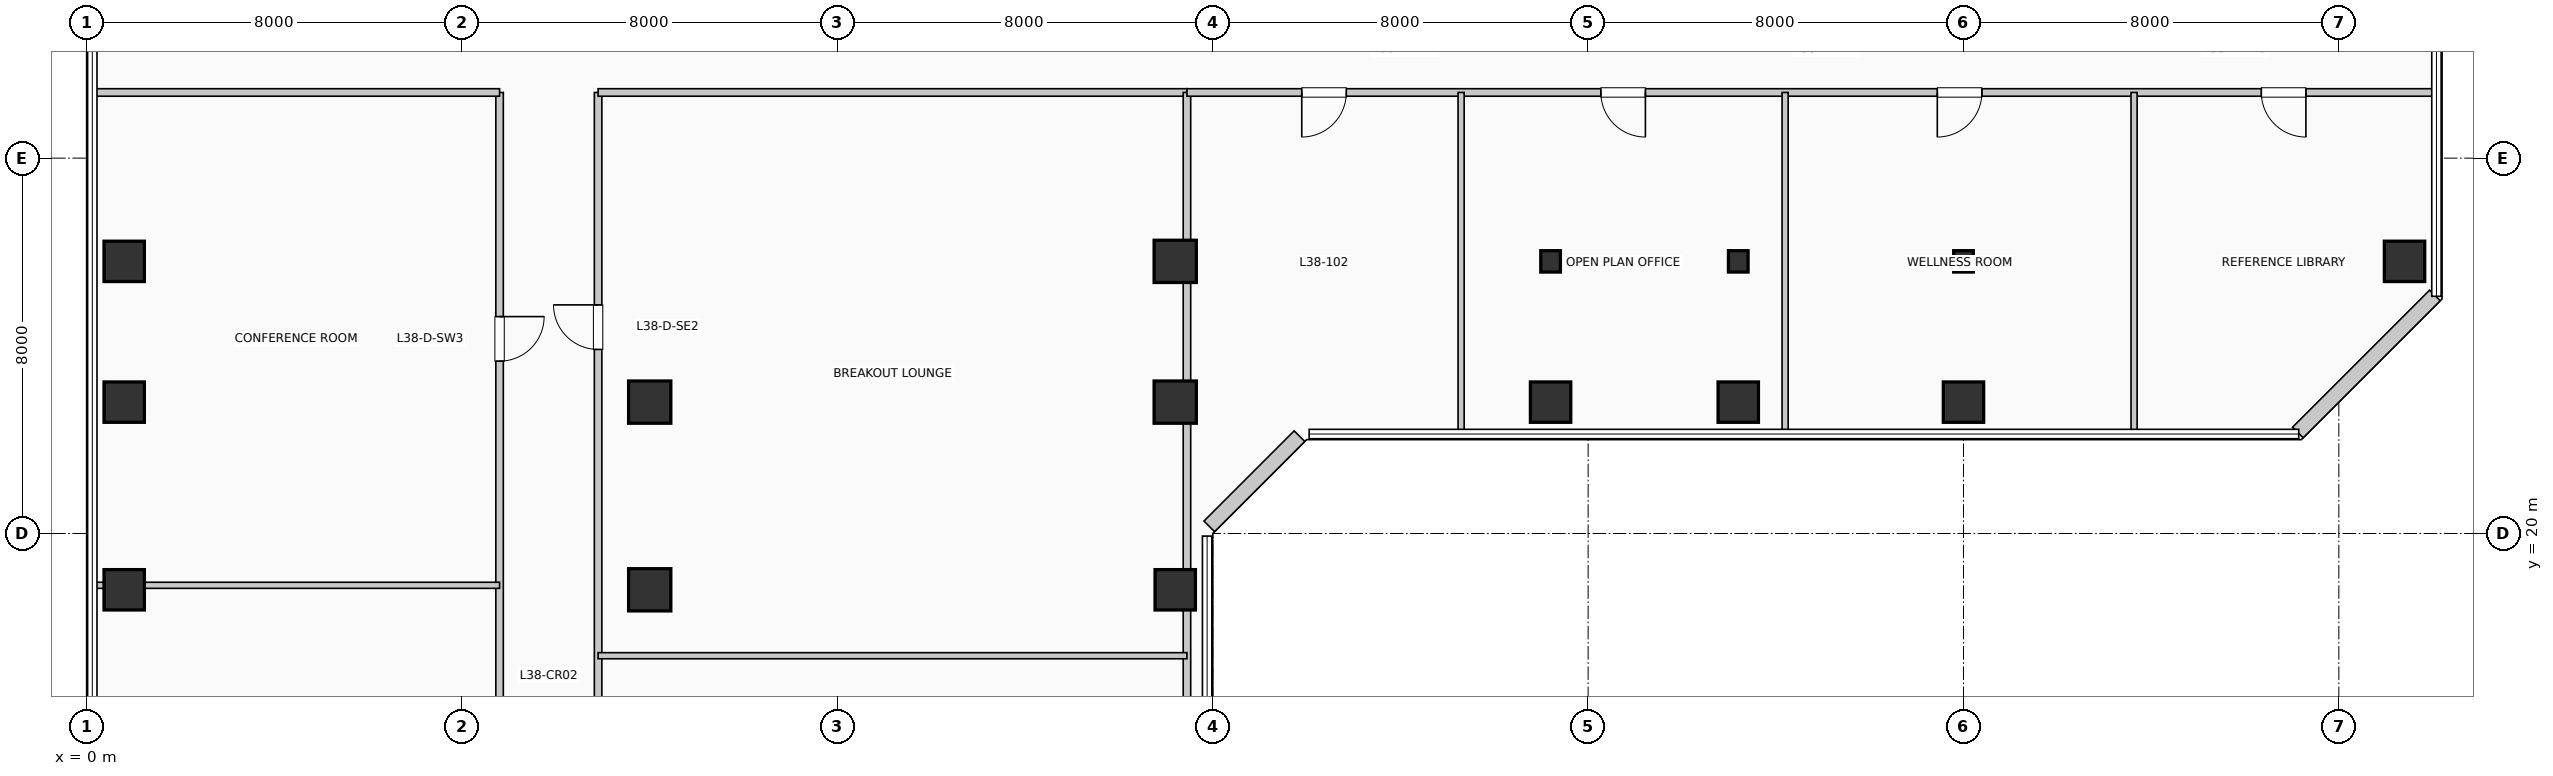
"""IFC4 building model, lengths in metres.
Left out: names, types, materials, properties, quantities, classifications, styles, units other than length and angle.
Written with IfcOpenShell. Run it as: python <this file> out.ifc"""

import sys

from ifc_helpers import new_model, si_unit, direction, frame, frame_2d, origin, origin_2d, place, context, subcontext, project, spatial, rectangle, i_section, extrude, element, fill, save


model = new_model("IFC4")
c1 = context("Model", 3, precision=1e-05, world=origin(), true_north=direction((0.0, 1.0)))
c2 = subcontext(c1, "Body", "Model", "MODEL_VIEW")
j1 = project(units=[si_unit("LENGTHUNIT", "METRE"), si_unit("PLANEANGLEUNIT", "RADIAN")], contexts=[c1])
p1 = place(None, origin())
s1 = spatial("IfcSite", under=j1, at=p1, CompositionType="ELEMENT")
p2 = place(p1, origin())
s2 = spatial("IfcBuilding", under=s1, at=p2, CompositionType="ELEMENT")
p3 = place(p2, frame((0.0, 0.0, 158.73)))
s3 = spatial("IfcBuildingStorey", under=s2, at=p3, CompositionType="ELEMENT", Elevation=158.73)
for number, where, z_axis, x_axis in (
    (1, (0.8, 18.8, 0.0), (0.0, 0.0, 1.0), (1.0, 0.0, 0.0)),
    (2, (0.8, 22.8, 0.0), (0.0, 0.0, 1.0), (1.0, 0.0, 0.0)),
    (3, (0.8, 25.8, 0.0), (0.0, 0.0, 1.0), (1.0, 0.0, 0.0)),
):
    element("IfcColumn", number, at=place(p3, frame(where, z_axis=z_axis, x_axis=x_axis)), inside=s3, PredefinedType="COLUMN", context=c2, shape_type="SweptSolid", body=[
        extrude(rectangle(XDim=0.86, YDim=0.86, at=origin_2d()), origin(), (0.0, 0.0, 1.0), 3.96),
    ])
for number, where, z_axis, x_axis in (
    (4, (12.0, 18.8, 0.0), (0.0, 0.0, 1.0), (1.0, 0.0, 0.0)),
    (5, (12.0, 22.8, 0.0), (0.0, 0.0, 1.0), (1.0, 0.0, 0.0)),
):
    element("IfcColumn", number, at=place(p3, frame(where, z_axis=z_axis, x_axis=x_axis)), inside=s3, PredefinedType="COLUMN", context=c2, shape_type="SweptSolid", body=[
        extrude(rectangle(XDim=0.9, YDim=0.9, at=origin_2d()), origin(), (0.0, 0.0, 1.0), 3.96),
    ])
p4 = place(p3, frame((23.2, 18.8, 0.0), z_axis=(0.0, 0.0, 1.0), x_axis=(1.0, 0.0, 0.0)))
e6 = element("IfcColumn", 6, at=p4, inside=s3, PredefinedType="COLUMN", context=c2, shape_type="SweptSolid", body=[
    extrude(rectangle(XDim=0.86, YDim=0.86, at=origin_2d()), origin(), (0.0, 0.0, 1.0), 3.96),
])
for number, where, z_axis, x_axis in (
    (7, (23.2, 22.8, 0.0), (0.0, 0.0, 1.0), (1.0, 0.0, 0.0)),
    (8, (23.2, 25.8, 0.0), (0.0, 0.0, 1.0), (1.0, 0.0, 0.0)),
):
    element("IfcColumn", number, at=place(p3, frame(where, z_axis=z_axis, x_axis=x_axis)), inside=s3, PredefinedType="COLUMN", context=c2, shape_type="SweptSolid", body=[
        extrude(rectangle(XDim=0.9, YDim=0.9, at=origin_2d()), origin(), (0.0, 0.0, 1.0), 3.96),
    ])
p5 = place(p3, frame((31.2, 22.8, 0.0), z_axis=(0.0, 0.0, 1.0), x_axis=(1.0, 0.0, 0.0)))
e9 = element("IfcColumn", 9, at=p5, inside=s3, PredefinedType="COLUMN", context=c2, shape_type="SweptSolid", body=[
    extrude(rectangle(XDim=0.86, YDim=0.86, at=origin_2d()), origin(), (0.0, 0.0, 1.0), 3.96),
])
p6 = place(p3, frame((31.2, 25.8, 0.0), z_axis=(0.0, 0.0, 1.0), x_axis=(1.0, 0.0, 0.0)))
e10 = element("IfcColumn", 10, at=p6, inside=s3, PredefinedType="COLUMN", context=c2, shape_type="SweptSolid", body=[
    extrude(i_section(OverallWidth=0.418, OverallDepth=0.455, WebThickness=0.032, FlangeThickness=0.051, at=origin_2d()), origin(), (0.0, 0.0, 1.0), 3.96),
])
p7 = place(p3, frame((35.2, 22.8, 0.0), z_axis=(0.0, 0.0, 1.0), x_axis=(1.0, 0.0, 0.0)))
e11 = element("IfcColumn", 11, at=p7, inside=s3, PredefinedType="COLUMN", context=c2, shape_type="SweptSolid", body=[
    extrude(rectangle(XDim=0.86, YDim=0.86, at=origin_2d()), origin(), (0.0, 0.0, 1.0), 3.96),
])
p8 = place(p3, frame((35.2, 25.8, 0.0), z_axis=(0.0, 0.0, 1.0), x_axis=(1.0, 0.0, 0.0)))
e12 = element("IfcColumn", 12, at=p8, inside=s3, PredefinedType="COLUMN", context=c2, shape_type="SweptSolid", body=[
    extrude(i_section(OverallWidth=0.418, OverallDepth=0.455, WebThickness=0.032, FlangeThickness=0.051, at=origin_2d()), origin(), (0.0, 0.0, 1.0), 3.96),
])
p9 = place(p3, frame((40.0, 22.8, 0.0), z_axis=(0.0, 0.0, 1.0), x_axis=(1.0, 0.0, 0.0)))
e13 = element("IfcColumn", 13, at=p9, inside=s3, PredefinedType="COLUMN", context=c2, shape_type="SweptSolid", body=[
    extrude(rectangle(XDim=0.86, YDim=0.86, at=origin_2d()), origin(), (0.0, 0.0, 1.0), 3.96),
])
p10 = place(p3, frame((40.0, 25.8, 0.0), z_axis=(0.0, 0.0, 1.0), x_axis=(1.0, 0.0, 0.0)))
e14 = element("IfcColumn", 14, at=p10, inside=s3, PredefinedType="COLUMN", context=c2, shape_type="SweptSolid", body=[
    extrude(i_section(OverallWidth=0.418, OverallDepth=0.455, WebThickness=0.032, FlangeThickness=0.051, at=origin_2d()), origin(), (0.0, 0.0, 1.0), 3.96),
])
p11 = place(p3, frame((49.4, 25.8, 0.0), z_axis=(0.0, 0.0, 1.0), x_axis=(1.0, 0.0, 0.0)))
e15 = element("IfcColumn", 15, at=p11, inside=s3, PredefinedType="COLUMN", context=c2, shape_type="SweptSolid", body=[
    extrude(rectangle(XDim=0.86, YDim=0.86, at=origin_2d()), origin(), (0.0, 0.0, 1.0), 3.96),
])
p12 = place(p3, frame((23.926, 20.152, 0.0), z_axis=(0.0, 0.0, 1.0), x_axis=(0.707106781187, 0.707106781187, 0.0)))
e16 = element("IfcWall", 16, at=p12, inside=s3, PredefinedType="SOLIDWALL", context=c2, shape_type="SweptSolid", body=[
    extrude(rectangle(XDim=2.718, YDim=0.32, at=frame_2d((1.359, 0.0))), origin(), (0.0, 0.0, 1.0), 3.71),
])
p13 = place(p3, frame((47.126, 22.152, 0.0), z_axis=(0.0, 0.0, 1.0), x_axis=(0.707136318428, 0.707077242712, 0.0)))
e17 = element("IfcWall", 17, at=p13, inside=s3, PredefinedType="SOLIDWALL", context=c2, shape_type="SweptSolid", body=[
    extrude(rectangle(XDim=4.133, YDim=0.32, at=frame_2d((2.066, 0.0))), origin(), (0.0, 0.0, 1.0), 3.71),
])
p14 = place(p3, frame((8.8, 4.39, 0.0), z_axis=(0.0, 0.0, 1.0), x_axis=(0.0, 1.0, 0.0)))
e18 = element("IfcWall", 18, at=p14, inside=s3, PredefinedType="PARTITIONING", context=c2, shape_type="SweptSolid", body=[
    extrude(rectangle(XDim=25.01, YDim=0.16, at=frame_2d((12.505, 0.0))), origin(), (0.0, 0.0, 1.0), 3.71),
])
p15 = place(p14, frame((3.976, 0.0, 0.0), z_axis=(0.0, 0.0, 1.0), x_axis=(-1.0, 0.0, 0.0)))
e19 = element("IfcOpeningElement", 19, at=p15, cuts=e18, PredefinedType="OPENING", context=c2, shape_type="SweptSolid", body=[
    extrude(rectangle(XDim=0.95, YDim=2.15, at=frame_2d((0.475, 1.075))), frame((0.0, 0.09, 0.0), z_axis=(0.0, -1.0, 0.0), x_axis=(1.0, 0.0, 0.0)), (0.0, 0.0, 1.0), 0.18),
])
p16 = place(p14, frame((11.229, 0.0, 0.0), z_axis=(0.0, 0.0, 1.0), x_axis=(-1.0, 0.0, 0.0)))
e20 = element("IfcOpeningElement", 20, at=p16, cuts=e18, PredefinedType="OPENING", context=c2, shape_type="SweptSolid", body=[
    extrude(rectangle(XDim=0.95, YDim=2.15, at=frame_2d((0.475, 1.075))), frame((0.0, 0.09, 0.0), z_axis=(0.0, -1.0, 0.0), x_axis=(1.0, 0.0, 0.0)), (0.0, 0.0, 1.0), 0.18),
])
p17 = place(p14, frame((20.233, 0.0, 0.0), z_axis=(0.0, 0.0, 1.0), x_axis=(-1.0, 0.0, 0.0)))
e21 = element("IfcOpeningElement", 21, at=p17, cuts=e18, PredefinedType="OPENING", context=c2, shape_type="SweptSolid", body=[
    extrude(rectangle(XDim=0.95, YDim=2.15, at=frame_2d((0.475, 1.075))), frame((0.0, 0.09, 0.0), z_axis=(0.0, -1.0, 0.0), x_axis=(1.0, 0.0, 0.0)), (0.0, 0.0, 1.0), 0.18),
])
p18 = place(p3, frame((10.9, 4.39, 0.0), z_axis=(0.0, 0.0, 1.0), x_axis=(0.0, 1.0, 0.0)))
e22 = element("IfcWall", 22, at=p18, inside=s3, PredefinedType="PARTITIONING", context=c2, shape_type="SweptSolid", body=[
    extrude(rectangle(XDim=25.01, YDim=0.16, at=frame_2d((12.505, 0.0))), origin(), (0.0, 0.0, 1.0), 3.71),
])
p19 = place(p18, frame((6.028, 0.0, 0.0)))
e23 = element("IfcOpeningElement", 23, at=p19, cuts=e22, PredefinedType="OPENING", context=c2, shape_type="SweptSolid", body=[
    extrude(rectangle(XDim=0.95, YDim=2.15, at=frame_2d((0.475, 1.075))), frame((0.0, 0.09, 0.0), z_axis=(0.0, -1.0, 0.0), x_axis=(1.0, 0.0, 0.0)), (0.0, 0.0, 1.0), 0.18),
])
p20 = place(p18, frame((19.533, 0.0, 0.0)))
e24 = element("IfcOpeningElement", 24, at=p20, cuts=e22, PredefinedType="OPENING", context=c2, shape_type="SweptSolid", body=[
    extrude(rectangle(XDim=0.95, YDim=2.15, at=frame_2d((0.475, 1.075))), frame((0.0, 0.09, 0.0), z_axis=(0.0, -1.0, 0.0), x_axis=(1.0, 0.0, 0.0)), (0.0, 0.0, 1.0), 0.18),
])
p21 = place(p3, frame((0.19, 29.4, 0.0), z_axis=(0.0, 0.0, 1.0), x_axis=(1.0, 0.0, 0.0)))
e25 = element("IfcWall", 25, at=p21, inside=s3, PredefinedType="PARTITIONING", context=c2, shape_type="SweptSolid", body=[
    extrude(rectangle(XDim=8.61, YDim=0.16, at=frame_2d((4.305, 0.0))), origin(), (0.0, 0.0, 1.0), 3.365),
])
p22 = place(p3, frame((10.9, 29.4, 0.0), z_axis=(0.0, 0.0, 1.0), x_axis=(1.0, 0.0, 0.0)))
e26 = element("IfcWall", 26, at=p22, inside=s3, PredefinedType="PARTITIONING", context=c2, shape_type="SweptSolid", body=[
    extrude(rectangle(XDim=12.55, YDim=0.16, at=frame_2d((6.275, 0.0))), origin(), (0.0, 0.0, 1.0), 3.365),
])
p23 = place(p3, frame((23.45, 0.19, 0.0), z_axis=(0.0, 0.0, 1.0), x_axis=(0.0, 1.0, 0.0)))
e27 = element("IfcWall", 27, at=p23, inside=s3, PredefinedType="PARTITIONING", context=c2, shape_type="SweptSolid", body=[
    extrude(rectangle(XDim=29.21, YDim=0.16, at=frame_2d((14.605, 0.0))), origin(), (0.0, 0.0, 1.0), 3.045),
])
p24 = place(p3, frame((0.19, 18.896, 0.0), z_axis=(0.0, 0.0, 1.0), x_axis=(1.0, 0.0, 0.0)))
e28 = element("IfcWall", 28, at=p24, inside=s3, PredefinedType="PARTITIONING", context=c2, shape_type="SweptSolid", body=[
    extrude(rectangle(XDim=8.61, YDim=0.13, at=frame_2d((4.305, 0.0))), origin(), (0.0, 0.0, 1.0), 3.045),
])
p25 = place(p3, frame((10.9, 17.395, 0.0), z_axis=(0.0, 0.0, 1.0), x_axis=(1.0, 0.0, 0.0)))
e29 = element("IfcWall", 29, at=p25, inside=s3, PredefinedType="PARTITIONING", context=c2, shape_type="SweptSolid", body=[
    extrude(rectangle(XDim=12.55, YDim=0.13, at=frame_2d((6.275, 0.0))), origin(), (0.0, 0.0, 1.0), 3.71),
])
p26 = place(p3, frame((23.45, 29.4, 0.0), z_axis=(0.0, 0.0, 1.0), x_axis=(1.0, 0.0, 0.0)))
e30 = element("IfcWall", 30, at=p26, inside=s3, PredefinedType="PARTITIONING", context=c2, shape_type="SweptSolid", body=[
    extrude(rectangle(XDim=26.56, YDim=0.16, at=frame_2d((13.28, 0.0))), origin(), (0.0, 0.0, 1.0), 3.365),
])
p27 = place(p26, frame((3.396, 0.0, 0.0), z_axis=(0.0, 0.0, 1.0), x_axis=(-1.0, 0.0, 0.0)))
e31 = element("IfcOpeningElement", 31, at=p27, cuts=e30, PredefinedType="OPENING", context=c2, shape_type="SweptSolid", body=[
    extrude(rectangle(XDim=0.95, YDim=2.15, at=frame_2d((0.475, 1.075))), frame((0.0, 0.09, 0.0), z_axis=(0.0, -1.0, 0.0), x_axis=(1.0, 0.0, 0.0)), (0.0, 0.0, 1.0), 0.18),
])
p28 = place(p26, frame((9.771, 0.0, 0.0), z_axis=(0.0, 0.0, 1.0), x_axis=(-1.0, 0.0, 0.0)))
e32 = element("IfcOpeningElement", 32, at=p28, cuts=e30, PredefinedType="OPENING", context=c2, shape_type="SweptSolid", body=[
    extrude(rectangle(XDim=0.95, YDim=2.15, at=frame_2d((0.475, 1.075))), frame((0.0, 0.09, 0.0), z_axis=(0.0, -1.0, 0.0), x_axis=(1.0, 0.0, 0.0)), (0.0, 0.0, 1.0), 0.18),
])
p29 = place(p26, frame((16.942, 0.0, 0.0), z_axis=(0.0, 0.0, 1.0), x_axis=(-1.0, 0.0, 0.0)))
e33 = element("IfcOpeningElement", 33, at=p29, cuts=e30, PredefinedType="OPENING", context=c2, shape_type="SweptSolid", body=[
    extrude(rectangle(XDim=0.95, YDim=2.15, at=frame_2d((0.475, 1.075))), frame((0.0, 0.09, 0.0), z_axis=(0.0, -1.0, 0.0), x_axis=(1.0, 0.0, 0.0)), (0.0, 0.0, 1.0), 0.18),
])
p30 = place(p26, frame((23.848, 0.0, 0.0), z_axis=(0.0, 0.0, 1.0), x_axis=(-1.0, 0.0, 0.0)))
e34 = element("IfcOpeningElement", 34, at=p30, cuts=e30, PredefinedType="OPENING", context=c2, shape_type="SweptSolid", body=[
    extrude(rectangle(XDim=0.95, YDim=2.15, at=frame_2d((0.475, 1.075))), frame((0.0, 0.09, 0.0), z_axis=(0.0, -1.0, 0.0), x_axis=(1.0, 0.0, 0.0)), (0.0, 0.0, 1.0), 0.18),
])
for number, where, z_axis, x_axis in (
    (35, (29.293, 22.19, 0.0), (0.0, 0.0, 1.0), (0.0, 1.0, 0.0)),
    (36, (36.199, 22.19, 0.0), (0.0, 0.0, 1.0), (0.0, 1.0, 0.0)),
    (37, (43.635, 22.19, 0.0), (0.0, 0.0, 1.0), (0.0, 1.0, 0.0)),
):
    element("IfcWall", number, at=place(p3, frame(where, z_axis=z_axis, x_axis=x_axis)), inside=s3, PredefinedType="PARTITIONING", context=c2, shape_type="SweptSolid", body=[
        extrude(rectangle(XDim=7.21, YDim=0.13, at=frame_2d((3.605, 0.0))), origin(), (0.0, 0.0, 1.0), 3.71),
    ])
p31 = place(p17, origin())
e38 = element("IfcDoor", 38, at=p31, inside=s3, OperationType="SINGLE_SWING_RIGHT", PredefinedType="DOOR", context=c2, shape_type="SweptSolid", body=[
    extrude(rectangle(XDim=0.95, YDim=2.15, at=frame_2d((0.475, 1.075))), frame((0.0, 0.025, 0.0), z_axis=(0.0, -1.0, 0.0), x_axis=(1.0, 0.0, 0.0)), (0.0, 0.0, 1.0), 0.05),
])
fill(e21, e38)
p32 = place(p20, origin())
e39 = element("IfcDoor", 39, at=p32, inside=s3, OperationType="SINGLE_SWING_RIGHT", PredefinedType="DOOR", context=c2, shape_type="SweptSolid", body=[
    extrude(rectangle(XDim=0.95, YDim=2.15, at=frame_2d((0.475, 1.075))), frame((0.0, 0.025, 0.0), z_axis=(0.0, -1.0, 0.0), x_axis=(1.0, 0.0, 0.0)), (0.0, 0.0, 1.0), 0.05),
])
fill(e24, e39)
p33 = place(p27, origin())
e40 = element("IfcDoor", 40, at=p33, inside=s3, OperationType="SINGLE_SWING_LEFT", PredefinedType="DOOR", context=c2, shape_type="SweptSolid", body=[
    extrude(rectangle(XDim=0.95, YDim=2.15, at=frame_2d((0.475, 1.075))), frame((0.0, 0.025, 0.0), z_axis=(0.0, -1.0, 0.0), x_axis=(1.0, 0.0, 0.0)), (0.0, 0.0, 1.0), 0.05),
])
fill(e31, e40)
p34 = place(p28, origin())
e41 = element("IfcDoor", 41, at=p34, inside=s3, OperationType="SINGLE_SWING_RIGHT", PredefinedType="DOOR", context=c2, shape_type="SweptSolid", body=[
    extrude(rectangle(XDim=0.95, YDim=2.15, at=frame_2d((0.475, 1.075))), frame((0.0, 0.025, 0.0), z_axis=(0.0, -1.0, 0.0), x_axis=(1.0, 0.0, 0.0)), (0.0, 0.0, 1.0), 0.05),
])
fill(e32, e41)
p35 = place(p29, origin())
e42 = element("IfcDoor", 42, at=p35, inside=s3, OperationType="SINGLE_SWING_LEFT", PredefinedType="DOOR", context=c2, shape_type="SweptSolid", body=[
    extrude(rectangle(XDim=0.95, YDim=2.15, at=frame_2d((0.475, 1.075))), frame((0.0, 0.025, 0.0), z_axis=(0.0, -1.0, 0.0), x_axis=(1.0, 0.0, 0.0)), (0.0, 0.0, 1.0), 0.05),
])
fill(e33, e42)
p36 = place(p30, origin())
e43 = element("IfcDoor", 43, at=p36, inside=s3, OperationType="SINGLE_SWING_RIGHT", PredefinedType="DOOR", context=c2, shape_type="SweptSolid", body=[
    extrude(rectangle(XDim=0.95, YDim=2.15, at=frame_2d((0.475, 1.075))), frame((0.0, 0.025, 0.0), z_axis=(0.0, -1.0, 0.0), x_axis=(1.0, 0.0, 0.0)), (0.0, 0.0, 1.0), 0.05),
])
fill(e34, e43)
save(model, sys.argv[1])
